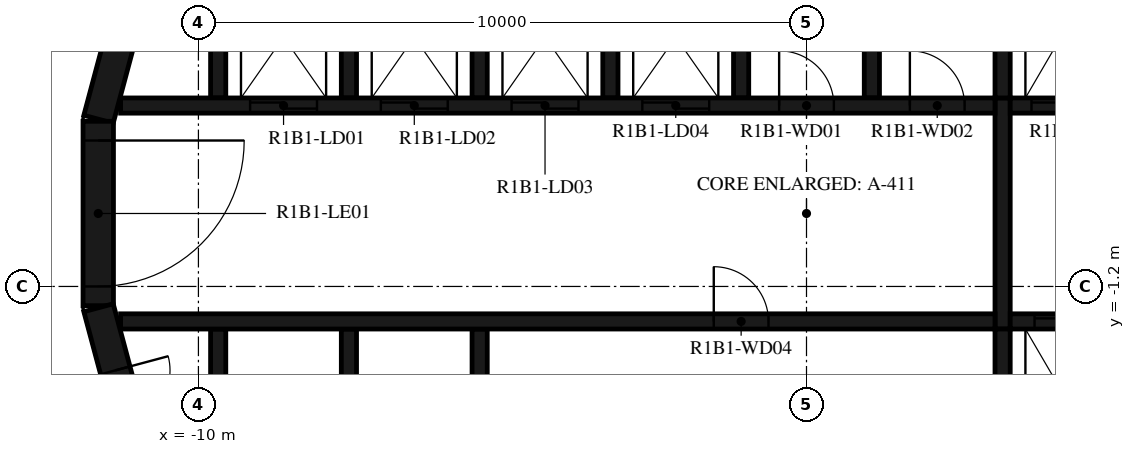
"""IFC4 building model, lengths in metres.
Left out: names, types, materials, properties, quantities, classifications, styles, units other than length and angle.
Written with IfcOpenShell. Run it as: python <this file> out.ifc"""

import sys

from ifc_helpers import new_model, si_unit, direction, frame, frame_2d, origin, place, context, subcontext, project, spatial, polyline, rectangle, outline, extrude, element, fill, save


model = new_model("IFC4")
c1 = context("Model", 3, precision=1e-05, world=origin(), true_north=direction((0.0, 1.0)))
c2 = subcontext(c1, "Body", "Model", "MODEL_VIEW")
j1 = project(units=[si_unit("LENGTHUNIT", "METRE"), si_unit("PLANEANGLEUNIT", "RADIAN")], contexts=[c1])
p1 = place(None, origin())
s1 = spatial("IfcSite", under=j1, at=p1, CompositionType="ELEMENT")
p2 = place(p1, origin())
s2 = spatial("IfcBuilding", under=s1, at=p2, CompositionType="ELEMENT")
p3 = place(p2, frame((0.0, 0.0, 48.9)))
s3 = spatial("IfcBuildingStorey", under=s2, at=p3, CompositionType="ELEMENT", Elevation=48.9)
p4 = place(p3, frame((-10.858, 4.479, 0.0), z_axis=(0.0, 0.0, 1.0), x_axis=(-0.258734743916, -0.965948410781, 0.0)))
e1 = element("IfcWall", 1, at=p4, inside=s3, PredefinedType="SHEAR", context=c2, shape_type="SweptSolid", body=[
    extrude(rectangle(XDim=3.033, YDim=0.5, at=frame_2d((1.516, 0.0))), origin(), (0.0, 0.0, 1.0), 3.12),
])
p5 = place(p3, frame((-11.647, 1.516, 0.0), z_axis=(0.0, 0.0, 1.0), x_axis=(0.0, -1.0, 0.0)))
e2 = element("IfcWall", 2, at=p5, inside=s3, PredefinedType="SHEAR", context=c2, shape_type="SweptSolid", body=[
    extrude(rectangle(XDim=3.033, YDim=0.5, at=frame_2d((1.516, 0.0))), origin(), (0.0, 0.0, 1.0), 3.12),
])
p6 = place(p5, frame((0.316, 0.0, 0.0)))
e3 = element("IfcOpeningElement", 3, at=p6, cuts=e2, PredefinedType="OPENING", context=c2, shape_type="SweptSolid", body=[
    extrude(rectangle(XDim=2.4, YDim=2.1, at=frame_2d((1.2, 1.05))), frame((0.0, 0.26, 0.0), z_axis=(0.0, -1.0, 0.0), x_axis=(1.0, 0.0, 0.0)), (0.0, 0.0, 1.0), 0.52),
])
p7 = place(p3, frame((-11.643, -1.55, 0.0), z_axis=(0.0, 0.0, 1.0), x_axis=(0.258734743916, -0.965948410781, 0.0)))
e4 = element("IfcWall", 4, at=p7, inside=s3, PredefinedType="SHEAR", context=c2, shape_type="SweptSolid", body=[
    extrude(rectangle(XDim=3.033, YDim=0.5, at=frame_2d((1.516, 0.0))), origin(), (0.0, 0.0, 1.0), 3.12),
])
p8 = place(p7, frame((1.066, 0.0, 0.0)))
e5 = element("IfcOpeningElement", 5, at=p8, cuts=e4, PredefinedType="OPENING", context=c2, shape_type="SweptSolid", body=[
    extrude(rectangle(XDim=0.9, YDim=2.1, at=frame_2d((0.45, 1.05))), frame((0.0, 0.26, 0.0), z_axis=(0.0, -1.0, 0.0), x_axis=(1.0, 0.0, 0.0)), (0.0, 0.0, 1.0), 0.52),
])
p9 = place(p3, origin())
e6 = element("IfcWall", 6, at=p9, inside=s3, PredefinedType="SHEAR", context=c2, shape_type="SweptSolid", body=[
    extrude(outline(polyline([(-9.55, 4.8), (-7.65, 4.8), (-7.65, 1.9), (-7.4, 1.9), (-7.4, 4.8), (-5.5, 4.8), (-5.5, 1.9), (-5.25, 1.9), (-5.25, 4.8), (-3.35, 4.8), (-3.35, 1.9), (-3.1, 1.9), (-3.1, 4.8), (-1.2, 4.8), (-1.2, 1.9), (-0.95, 1.9), (-0.95, 4.8), (0.95, 4.8), (0.95, 1.9), (1.2, 1.9), (1.2, 4.8), (3.1, 4.8), (3.1, 1.9), (3.35, 1.9), (3.35, 4.8), (5.25, 4.8), (5.25, 1.9), (5.5, 1.9), (5.5, 4.8), (7.4, 4.8), (7.4, 1.9), (7.65, 1.9), (7.65, 4.8), (9.55, 4.8), (9.55, 1.9), (9.8, 1.9), (9.8, 4.8), (9.8, 5.05), (-9.8, 5.05), (-9.8, 4.8), (-9.8, 1.9), (-9.55, 1.9), (-9.55, 4.8)])), origin(), (0.0, 0.0, 1.0), 3.12),
])
p10 = place(p3, origin())
e7 = element("IfcWall", 7, at=p10, inside=s3, PredefinedType="SHEAR", context=c2, shape_type="SweptSolid", body=[
    extrude(outline(polyline([(9.8, -5.05), (9.8, -4.8), (9.8, -1.9), (9.55, -1.9), (9.55, -4.8), (7.65, -4.8), (7.65, -1.9), (7.4, -1.9), (7.4, -4.8), (5.5, -4.8), (5.5, -1.9), (5.25, -1.9), (5.25, -4.8), (3.35, -4.8), (3.35, -1.9), (3.1, -1.9), (3.1, -4.8), (-5.25, -4.8), (-5.25, -1.9), (-5.5, -1.9), (-5.5, -4.8), (-7.4, -4.8), (-7.4, -1.9), (-7.65, -1.9), (-7.65, -4.8), (-9.55, -4.8), (-9.55, -1.9), (-9.8, -1.9), (-9.8, -4.8), (-9.8, -5.05), (9.8, -5.05)])), origin(), (0.0, 0.0, 1.0), 3.12),
])
p11 = place(p3, frame((-11.28, 1.775, 0.0), z_axis=(0.0, 0.0, 1.0), x_axis=(1.0, 0.0, 0.0)))
e8 = element("IfcWall", 8, at=p11, inside=s3, PredefinedType="SHEAR", context=c2, shape_type="SweptSolid", body=[
    extrude(rectangle(XDim=14.38, YDim=0.25, at=frame_2d((7.19, 0.0))), origin(), (0.0, 0.0, 1.0), 3.12),
])
p12 = place(p11, frame((2.13, 0.0, 0.0)))
e9 = element("IfcOpeningElement", 9, at=p12, cuts=e8, PredefinedType="OPENING", context=c2, shape_type="SweptSolid", body=[
    extrude(rectangle(XDim=1.1, YDim=2.1, at=frame_2d((0.55, 1.05))), frame((0.0, 0.135, 0.0), z_axis=(0.0, -1.0, 0.0), x_axis=(1.0, 0.0, 0.0)), (0.0, 0.0, 1.0), 0.27),
])
p13 = place(p11, frame((4.28, 0.0, 0.0)))
e10 = element("IfcOpeningElement", 10, at=p13, cuts=e8, PredefinedType="OPENING", context=c2, shape_type="SweptSolid", body=[
    extrude(rectangle(XDim=1.1, YDim=2.1, at=frame_2d((0.55, 1.05))), frame((0.0, 0.135, 0.0), z_axis=(0.0, -1.0, 0.0), x_axis=(1.0, 0.0, 0.0)), (0.0, 0.0, 1.0), 0.27),
])
p14 = place(p11, frame((6.43, 0.0, 0.0)))
e11 = element("IfcOpeningElement", 11, at=p14, cuts=e8, PredefinedType="OPENING", context=c2, shape_type="SweptSolid", body=[
    extrude(rectangle(XDim=1.1, YDim=2.1, at=frame_2d((0.55, 1.05))), frame((0.0, 0.135, 0.0), z_axis=(0.0, -1.0, 0.0), x_axis=(1.0, 0.0, 0.0)), (0.0, 0.0, 1.0), 0.27),
])
p15 = place(p11, frame((8.58, 0.0, 0.0)))
e12 = element("IfcOpeningElement", 12, at=p15, cuts=e8, PredefinedType="OPENING", context=c2, shape_type="SweptSolid", body=[
    extrude(rectangle(XDim=1.1, YDim=2.1, at=frame_2d((0.55, 1.05))), frame((0.0, 0.135, 0.0), z_axis=(0.0, -1.0, 0.0), x_axis=(1.0, 0.0, 0.0)), (0.0, 0.0, 1.0), 0.27),
])
p16 = place(p11, frame((10.83, 0.0, 0.0)))
e13 = element("IfcOpeningElement", 13, at=p16, cuts=e8, PredefinedType="OPENING", context=c2, shape_type="SweptSolid", body=[
    extrude(rectangle(XDim=0.9, YDim=2.1, at=frame_2d((0.45, 1.05))), frame((0.0, 0.135, 0.0), z_axis=(0.0, -1.0, 0.0), x_axis=(1.0, 0.0, 0.0)), (0.0, 0.0, 1.0), 0.27),
])
p17 = place(p11, frame((12.98, 0.0, 0.0)))
e14 = element("IfcOpeningElement", 14, at=p17, cuts=e8, PredefinedType="OPENING", context=c2, shape_type="SweptSolid", body=[
    extrude(rectangle(XDim=0.9, YDim=2.1, at=frame_2d((0.45, 1.05))), frame((0.0, 0.135, 0.0), z_axis=(0.0, -1.0, 0.0), x_axis=(1.0, 0.0, 0.0)), (0.0, 0.0, 1.0), 0.27),
])
p18 = place(p3, frame((3.35, 1.775, 0.0), z_axis=(0.0, 0.0, 1.0), x_axis=(1.0, 0.0, 0.0)))
e15 = element("IfcWall", 15, at=p18, inside=s3, PredefinedType="SHEAR", context=c2, shape_type="SweptSolid", body=[
    extrude(rectangle(XDim=7.93, YDim=0.25, at=frame_2d((3.965, 0.0))), origin(), (0.0, 0.0, 1.0), 3.12),
])
p19 = place(p18, frame((0.35, 0.0, 0.0)))
e16 = element("IfcOpeningElement", 16, at=p19, cuts=e15, PredefinedType="OPENING", context=c2, shape_type="SweptSolid", body=[
    extrude(rectangle(XDim=1.2, YDim=2.4, at=frame_2d((0.6, 1.2))), frame((0.0, 0.135, 0.0), z_axis=(0.0, -1.0, 0.0), x_axis=(1.0, 0.0, 0.0)), (0.0, 0.0, 1.0), 0.27),
])
p20 = place(p18, frame((2.5, 0.0, 0.0)))
e17 = element("IfcOpeningElement", 17, at=p20, cuts=e15, PredefinedType="OPENING", context=c2, shape_type="SweptSolid", body=[
    extrude(rectangle(XDim=1.2, YDim=2.4, at=frame_2d((0.6, 1.2))), frame((0.0, 0.135, 0.0), z_axis=(0.0, -1.0, 0.0), x_axis=(1.0, 0.0, 0.0)), (0.0, 0.0, 1.0), 0.27),
])
p21 = place(p18, frame((4.8, 0.0, 0.0)))
e18 = element("IfcOpeningElement", 18, at=p21, cuts=e15, PredefinedType="OPENING", context=c2, shape_type="SweptSolid", body=[
    extrude(rectangle(XDim=0.9, YDim=2.1, at=frame_2d((0.45, 1.05))), frame((0.0, 0.135, 0.0), z_axis=(0.0, -1.0, 0.0), x_axis=(1.0, 0.0, 0.0)), (0.0, 0.0, 1.0), 0.27),
])
p22 = place(p3, frame((-11.28, -1.775, 0.0), z_axis=(0.0, 0.0, 1.0), x_axis=(1.0, 0.0, 0.0)))
e19 = element("IfcWall", 19, at=p22, inside=s3, PredefinedType="SHEAR", context=c2, shape_type="SweptSolid", body=[
    extrude(rectangle(XDim=14.38, YDim=0.25, at=frame_2d((7.19, 0.0))), origin(), (0.0, 0.0, 1.0), 3.12),
])
p23 = place(p22, frame((9.755, 0.0, 0.0)))
e20 = element("IfcOpeningElement", 20, at=p23, cuts=e19, PredefinedType="OPENING", context=c2, shape_type="SweptSolid", body=[
    extrude(rectangle(XDim=0.9, YDim=2.1, at=frame_2d((0.45, 1.05))), frame((0.0, 0.135, 0.0), z_axis=(0.0, -1.0, 0.0), x_axis=(1.0, 0.0, 0.0)), (0.0, 0.0, 1.0), 0.27),
])
p24 = place(p3, frame((3.35, -1.775, 0.0), z_axis=(0.0, 0.0, 1.0), x_axis=(1.0, 0.0, 0.0)))
e21 = element("IfcWall", 21, at=p24, inside=s3, PredefinedType="SHEAR", context=c2, shape_type="SweptSolid", body=[
    extrude(rectangle(XDim=7.93, YDim=0.25, at=frame_2d((3.965, 0.0))), origin(), (0.0, 0.0, 1.0), 3.12),
])
p25 = place(p24, frame((0.4, 0.0, 0.0)))
e22 = element("IfcOpeningElement", 22, at=p25, cuts=e21, PredefinedType="OPENING", context=c2, shape_type="SweptSolid", body=[
    extrude(rectangle(XDim=1.1, YDim=2.4, at=frame_2d((0.55, 1.2))), frame((0.0, 0.135, 0.0), z_axis=(0.0, -1.0, 0.0), x_axis=(1.0, 0.0, 0.0)), (0.0, 0.0, 1.0), 0.27),
])
p26 = place(p24, frame((2.55, 0.0, 0.0)))
e23 = element("IfcOpeningElement", 23, at=p26, cuts=e21, PredefinedType="OPENING", context=c2, shape_type="SweptSolid", body=[
    extrude(rectangle(XDim=1.1, YDim=2.4, at=frame_2d((0.55, 1.2))), frame((0.0, 0.135, 0.0), z_axis=(0.0, -1.0, 0.0), x_axis=(1.0, 0.0, 0.0)), (0.0, 0.0, 1.0), 0.27),
])
p27 = place(p24, frame((4.7, 0.0, 0.0)))
e24 = element("IfcOpeningElement", 24, at=p27, cuts=e21, PredefinedType="OPENING", context=c2, shape_type="SweptSolid", body=[
    extrude(rectangle(XDim=1.1, YDim=2.4, at=frame_2d((0.55, 1.2))), frame((0.0, 0.135, 0.0), z_axis=(0.0, -1.0, 0.0), x_axis=(1.0, 0.0, 0.0)), (0.0, 0.0, 1.0), 0.27),
])
p28 = place(p3, frame((3.225, -1.9, 0.0), z_axis=(0.0, 0.0, 1.0), x_axis=(0.0, 1.0, 0.0)))
e25 = element("IfcWall", 25, at=p28, inside=s3, PredefinedType="SHEAR", context=c2, shape_type="SweptSolid", body=[
    extrude(rectangle(XDim=3.8, YDim=0.25, at=frame_2d((1.9, 0.0))), origin(), (0.0, 0.0, 1.0), 3.12),
])
p29 = place(p6, origin())
e26 = element("IfcDoor", 26, at=p29, inside=s3, OperationType="DOUBLE_DOOR_SINGLE_SWING", PredefinedType="DOOR", context=c2, shape_type="SweptSolid", body=[
    extrude(rectangle(XDim=2.4, YDim=2.1, at=frame_2d((1.2, 1.05))), frame((0.0, 0.025, 0.0), z_axis=(0.0, -1.0, 0.0), x_axis=(1.0, 0.0, 0.0)), (0.0, 0.0, 1.0), 0.05),
])
fill(e3, e26)
p30 = place(p12, origin())
e27 = element("IfcDoor", 27, at=p30, inside=s3, OperationType="DOUBLE_DOOR_SLIDING", PredefinedType="DOOR", context=c2, shape_type="SweptSolid", body=[
    extrude(rectangle(XDim=1.1, YDim=2.1, at=frame_2d((0.55, 1.05))), frame((0.0, 0.025, 0.0), z_axis=(0.0, -1.0, 0.0), x_axis=(1.0, 0.0, 0.0)), (0.0, 0.0, 1.0), 0.05),
])
fill(e9, e27)
p31 = place(p13, origin())
e28 = element("IfcDoor", 28, at=p31, inside=s3, OperationType="DOUBLE_DOOR_SLIDING", PredefinedType="DOOR", context=c2, shape_type="SweptSolid", body=[
    extrude(rectangle(XDim=1.1, YDim=2.1, at=frame_2d((0.55, 1.05))), frame((0.0, 0.025, 0.0), z_axis=(0.0, -1.0, 0.0), x_axis=(1.0, 0.0, 0.0)), (0.0, 0.0, 1.0), 0.05),
])
fill(e10, e28)
p32 = place(p14, origin())
e29 = element("IfcDoor", 29, at=p32, inside=s3, OperationType="DOUBLE_DOOR_SLIDING", PredefinedType="DOOR", context=c2, shape_type="SweptSolid", body=[
    extrude(rectangle(XDim=1.1, YDim=2.1, at=frame_2d((0.55, 1.05))), frame((0.0, 0.025, 0.0), z_axis=(0.0, -1.0, 0.0), x_axis=(1.0, 0.0, 0.0)), (0.0, 0.0, 1.0), 0.05),
])
fill(e11, e29)
p33 = place(p15, origin())
e30 = element("IfcDoor", 30, at=p33, inside=s3, OperationType="DOUBLE_DOOR_SLIDING", PredefinedType="DOOR", context=c2, shape_type="SweptSolid", body=[
    extrude(rectangle(XDim=1.1, YDim=2.1, at=frame_2d((0.55, 1.05))), frame((0.0, 0.025, 0.0), z_axis=(0.0, -1.0, 0.0), x_axis=(1.0, 0.0, 0.0)), (0.0, 0.0, 1.0), 0.05),
])
fill(e12, e30)
p34 = place(p19, origin())
e31 = element("IfcDoor", 31, at=p34, inside=s3, OperationType="DOUBLE_DOOR_SLIDING", PredefinedType="DOOR", context=c2, shape_type="SweptSolid", body=[
    extrude(rectangle(XDim=1.2, YDim=2.4, at=frame_2d((0.6, 1.2))), frame((0.0, 0.025, 0.0), z_axis=(0.0, -1.0, 0.0), x_axis=(1.0, 0.0, 0.0)), (0.0, 0.0, 1.0), 0.05),
])
fill(e16, e31)
p35 = place(p25, origin())
e32 = element("IfcDoor", 32, at=p35, inside=s3, OperationType="DOUBLE_DOOR_SLIDING", PredefinedType="DOOR", context=c2, shape_type="SweptSolid", body=[
    extrude(rectangle(XDim=1.1, YDim=2.4, at=frame_2d((0.55, 1.2))), frame((0.0, 0.025, 0.0), z_axis=(0.0, -1.0, 0.0), x_axis=(1.0, 0.0, 0.0)), (0.0, 0.0, 1.0), 0.05),
])
fill(e22, e32)
p36 = place(p16, origin())
e33 = element("IfcDoor", 33, at=p36, inside=s3, OperationType="SINGLE_SWING_RIGHT", PredefinedType="DOOR", context=c2, shape_type="SweptSolid", body=[
    extrude(rectangle(XDim=0.9, YDim=2.1, at=frame_2d((0.45, 1.05))), frame((0.0, 0.025, 0.0), z_axis=(0.0, -1.0, 0.0), x_axis=(1.0, 0.0, 0.0)), (0.0, 0.0, 1.0), 0.05),
])
fill(e13, e33)
p37 = place(p17, origin())
e34 = element("IfcDoor", 34, at=p37, inside=s3, OperationType="SINGLE_SWING_LEFT", PredefinedType="DOOR", context=c2, shape_type="SweptSolid", body=[
    extrude(rectangle(XDim=0.9, YDim=2.1, at=frame_2d((0.45, 1.05))), frame((0.0, 0.025, 0.0), z_axis=(0.0, -1.0, 0.0), x_axis=(1.0, 0.0, 0.0)), (0.0, 0.0, 1.0), 0.05),
])
fill(e14, e34)
p38 = place(p23, origin())
e35 = element("IfcDoor", 35, at=p38, inside=s3, OperationType="SINGLE_SWING_LEFT", PredefinedType="DOOR", context=c2, shape_type="SweptSolid", body=[
    extrude(rectangle(XDim=0.9, YDim=2.1, at=frame_2d((0.45, 1.05))), frame((0.0, 0.025, 0.0), z_axis=(0.0, -1.0, 0.0), x_axis=(1.0, 0.0, 0.0)), (0.0, 0.0, 1.0), 0.05),
])
fill(e20, e35)
p39 = place(p8, origin())
e36 = element("IfcDoor", 36, at=p39, inside=s3, OperationType="SINGLE_SWING_RIGHT", PredefinedType="DOOR", context=c2, shape_type="SweptSolid", body=[
    extrude(rectangle(XDim=0.9, YDim=2.1, at=frame_2d((0.45, 1.05))), frame((0.0, 0.025, 0.0), z_axis=(0.0, -1.0, 0.0), x_axis=(1.0, 0.0, 0.0)), (0.0, 0.0, 1.0), 0.05),
])
fill(e5, e36)
save(model, sys.argv[1])
